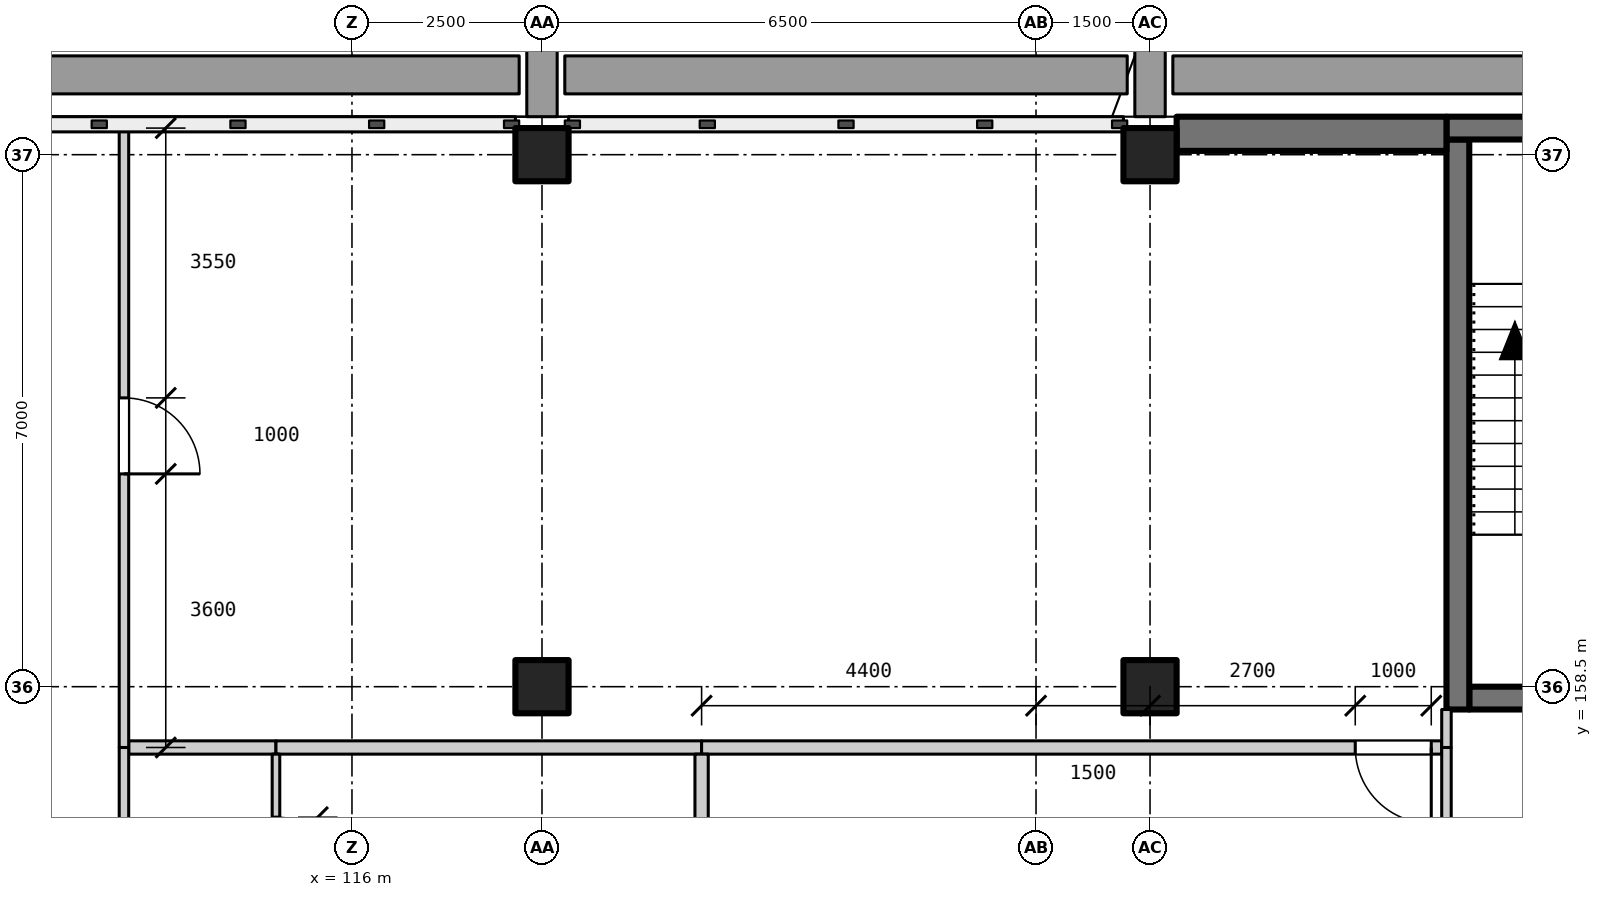
"""IFC4 building model, lengths in metres.
Left out: names, types, materials, properties, quantities, classifications, styles, units other than length and angle.
Written with IfcOpenShell. Run it as: python <this file> out.ifc"""

import sys

from ifc_helpers import new_model, si_unit, direction, frame, frame_2d, origin, origin_2d, place, context, subcontext, project, spatial, rectangle, extrude, element, fill, save


model = new_model("IFC4")
c1 = context("Model", 3, precision=1e-05, world=origin(), true_north=direction((0.0, 1.0)))
c2 = subcontext(c1, "Body", "Model", "MODEL_VIEW")
j1 = project(units=[si_unit("LENGTHUNIT", "METRE"), si_unit("PLANEANGLEUNIT", "RADIAN")], contexts=[c1])
p1 = place(None, origin())
s1 = spatial("IfcSite", under=j1, at=p1, CompositionType="ELEMENT")
p2 = place(p1, origin())
s2 = spatial("IfcBuilding", under=s1, at=p2, CompositionType="ELEMENT")
p3 = place(p2, frame((0.0, 0.0, 6.0)))
s3 = spatial("IfcBuildingStorey", under=s2, at=p3, CompositionType="ELEMENT", Elevation=6.0)
for number, where, z_axis, x_axis in (
    (1, (118.5, 158.5, 0.0), (0.0, 0.0, 1.0), (1.0, 0.0, 0.0)),
    (2, (118.5, 165.5, 0.0), (0.0, 0.0, 1.0), (1.0, 0.0, 0.0)),
    (3, (126.5, 158.5, 0.0), (0.0, 0.0, 1.0), (1.0, 0.0, 0.0)),
    (4, (126.5, 165.5, 0.0), (0.0, 0.0, 1.0), (1.0, 0.0, 0.0)),
):
    element("IfcColumn", number, at=place(p3, frame(where, z_axis=z_axis, x_axis=x_axis)), inside=s3, PredefinedType="COLUMN", context=c2, shape_type="SweptSolid", body=[
        extrude(rectangle(XDim=0.7, YDim=0.7, at=origin_2d()), origin(), (0.0, 0.0, 1.0), 4.2),
    ])
p4 = place(p3, frame((130.7, 158.35, 0.0), z_axis=(0.0, 0.0, 1.0), x_axis=(1.0, 0.0, 0.0)))
e5 = element("IfcWall", 5, at=p4, inside=s3, PredefinedType="SHEAR", context=c2, shape_type="SweptSolid", body=[
    extrude(rectangle(XDim=3.0, YDim=0.3, at=frame_2d((1.5, 0.0))), origin(), (0.0, 0.0, 1.0), 4.2),
])
p5 = place(p4, frame((0.95, 0.0, 0.0)))
e6 = element("IfcOpeningElement", 6, at=p5, cuts=e5, PredefinedType="OPENING", context=c2, shape_type="SweptSolid", body=[
    extrude(rectangle(XDim=1.1, YDim=2.1, at=frame_2d((0.55, 1.05))), frame((0.0, 0.16, 0.0), z_axis=(0.0, -1.0, 0.0), x_axis=(1.0, 0.0, 0.0)), (0.0, 0.0, 1.0), 0.32),
])
p6 = place(p3, frame((130.55, 158.2, 0.0), z_axis=(0.0, 0.0, 1.0), x_axis=(0.0, 1.0, 0.0)))
e7 = element("IfcWall", 7, at=p6, inside=s3, PredefinedType="SHEAR", context=c2, shape_type="SweptSolid", body=[
    extrude(rectangle(XDim=7.5, YDim=0.3, at=frame_2d((3.75, 0.0))), origin(), (0.0, 0.0, 1.0), 4.2),
])
p7 = place(p3, frame((130.4, 165.85, 0.0), z_axis=(0.0, 0.0, 1.0), x_axis=(1.0, 0.0, 0.0)))
e8 = element("IfcWall", 8, at=p7, inside=s3, PredefinedType="SOLIDWALL", context=c2, shape_type="SweptSolid", body=[
    extrude(rectangle(XDim=3.6, YDim=0.3, at=frame_2d((1.8, 0.0))), origin(), (0.0, 0.0, 1.0), 3.9),
])
p8 = place(p3, frame((126.85, 165.775, 0.0), z_axis=(0.0, 0.0, 1.0), x_axis=(1.0, 0.0, 0.0)))
e9 = element("IfcWall", 9, at=p8, inside=s3, PredefinedType="SOLIDWALL", context=c2, shape_type="SweptSolid", body=[
    extrude(rectangle(XDim=3.55, YDim=0.45, at=frame_2d((1.775, 0.0))), origin(), (0.0, 0.0, 1.0), 3.1),
])
p9 = place(p3, frame((113.062, 157.7, 0.0), z_axis=(0.0, 0.0, 1.0), x_axis=(1.0, 0.0, 0.0)))
e10 = element("IfcWall", 10, at=p9, inside=s3, PredefinedType="PARTITIONING", context=c2, shape_type="SweptSolid", body=[
    extrude(rectangle(XDim=1.938, YDim=0.175, at=frame_2d((0.969, 0.0))), origin(), (0.0, 0.0, 1.0), 3.9),
])
p10 = place(p3, frame((115.0, 157.7, 0.0), z_axis=(0.0, 0.0, 1.0), x_axis=(1.0, 0.0, 0.0)))
e11 = element("IfcWall", 11, at=p10, inside=s3, PredefinedType="PARTITIONING", context=c2, shape_type="SweptSolid", body=[
    extrude(rectangle(XDim=5.6, YDim=0.175, at=frame_2d((2.8, 0.0))), origin(), (0.0, 0.0, 1.0), 3.9),
])
p11 = place(p3, frame((120.6, 157.7, 0.0), z_axis=(0.0, 0.0, 1.0), x_axis=(1.0, 0.0, 0.0)))
e12 = element("IfcWall", 12, at=p11, inside=s3, PredefinedType="PARTITIONING", context=c2, shape_type="SweptSolid", body=[
    extrude(rectangle(XDim=9.737, YDim=0.175, at=frame_2d((4.869, 0.0))), origin(), (0.0, 0.0, 1.0), 3.9),
])
p12 = place(p11, frame((8.6, 0.0, 0.0)))
e13 = element("IfcOpeningElement", 13, at=p12, cuts=e12, PredefinedType="OPENING", context=c2, shape_type="SweptSolid", body=[
    extrude(rectangle(XDim=1.0, YDim=2.1, at=frame_2d((0.5, 1.05))), frame((0.0, 0.097, 0.0), z_axis=(0.0, -1.0, 0.0), x_axis=(1.0, 0.0, 0.0)), (0.0, 0.0, 1.0), 0.195),
])
p13 = place(p3, frame((113.0, 149.41, 0.0), z_axis=(0.0, 0.0, 1.0), x_axis=(0.0, 1.0, 0.0)))
e14 = element("IfcWall", 14, at=p13, inside=s3, PredefinedType="PARTITIONING", context=c2, shape_type="SweptSolid", body=[
    extrude(rectangle(XDim=8.29, YDim=0.125, at=frame_2d((4.145, 0.0))), origin(), (0.0, 0.0, 1.0), 3.9),
])
p14 = place(p3, frame((113.0, 157.7, 0.0), z_axis=(0.0, 0.0, 1.0), x_axis=(0.0, 1.0, 0.0)))
e15 = element("IfcWall", 15, at=p14, inside=s3, PredefinedType="PARTITIONING", context=c2, shape_type="SweptSolid", body=[
    extrude(rectangle(XDim=8.15, YDim=0.125, at=frame_2d((4.075, 0.0))), origin(), (0.0, 0.0, 1.0), 3.9),
])
p15 = place(p14, frame((3.6, 0.0, 0.0)))
e16 = element("IfcOpeningElement", 16, at=p15, cuts=e15, PredefinedType="OPENING", context=c2, shape_type="SweptSolid", body=[
    extrude(rectangle(XDim=1.0, YDim=2.1, at=frame_2d((0.5, 1.05))), frame((0.0, 0.073, 0.0), z_axis=(0.0, -1.0, 0.0), x_axis=(1.0, 0.0, 0.0)), (0.0, 0.0, 1.0), 0.145),
])
p16 = place(p3, frame((115.0, 154.933, 0.0), z_axis=(0.0, 0.0, 1.0), x_axis=(0.0, 1.0, 0.0)))
e17 = element("IfcWall", 17, at=p16, inside=s3, PredefinedType="PARTITIONING", context=c2, shape_type="SweptSolid", body=[
    extrude(rectangle(XDim=2.679, YDim=0.1, at=frame_2d((1.34, 0.0))), origin(), (0.0, 0.0, 1.0), 3.9),
])
p17 = place(p16, frame((0.85, 0.0, 0.0)))
e18 = element("IfcOpeningElement", 18, at=p17, cuts=e17, PredefinedType="OPENING", context=c2, shape_type="SweptSolid", body=[
    extrude(rectangle(XDim=1.0, YDim=2.1, at=frame_2d((0.5, 1.05))), frame((0.0, 0.06, 0.0), z_axis=(0.0, -1.0, 0.0), x_axis=(1.0, 0.0, 0.0)), (0.0, 0.0, 1.0), 0.12),
])
p18 = place(p3, frame((120.6, 154.933, 0.0), z_axis=(0.0, 0.0, 1.0), x_axis=(0.0, 1.0, 0.0)))
e19 = element("IfcWall", 19, at=p18, inside=s3, PredefinedType="PARTITIONING", context=c2, shape_type="SweptSolid", body=[
    extrude(rectangle(XDim=2.679, YDim=0.175, at=frame_2d((1.34, 0.0))), origin(), (0.0, 0.0, 1.0), 3.9),
])
p19 = place(p3, frame((130.4, 149.41, 0.0), z_axis=(0.0, 0.0, 1.0), x_axis=(0.0, 1.0, 0.0)))
e20 = element("IfcWall", 20, at=p19, inside=s3, PredefinedType="PARTITIONING", context=c2, shape_type="SweptSolid", body=[
    extrude(rectangle(XDim=8.29, YDim=0.125, at=frame_2d((4.145, 0.0))), origin(), (0.0, 0.0, 1.0), 3.9),
])
p20 = place(p3, frame((130.4, 157.7, 0.0), z_axis=(0.0, 0.0, 1.0), x_axis=(0.0, 1.0, 0.0)))
e21 = element("IfcWall", 21, at=p20, inside=s3, PredefinedType="PARTITIONING", context=c2, shape_type="SweptSolid", body=[
    extrude(rectangle(XDim=0.5, YDim=0.125, at=frame_2d((0.25, 0.0))), origin(), (0.0, 0.0, 1.0), 3.9),
])
p21 = place(p12, frame((1.0, 0.0, 0.0), z_axis=(0.0, 0.0, 1.0), x_axis=(-1.0, 0.0, 0.0)))
e22 = element("IfcDoor", 22, at=p21, inside=s3, OperationType="SINGLE_SWING_LEFT", PredefinedType="DOOR", context=c2, shape_type="SweptSolid", body=[
    extrude(rectangle(XDim=1.0, YDim=2.1, at=frame_2d((0.5, 1.05))), frame((0.0, 0.025, 0.0), z_axis=(0.0, -1.0, 0.0), x_axis=(1.0, 0.0, 0.0)), (0.0, 0.0, 1.0), 0.05),
])
fill(e13, e22)
p22 = place(p15, frame((1.0, 0.0, 0.0), z_axis=(0.0, 0.0, 1.0), x_axis=(-1.0, 0.0, 0.0)))
e23 = element("IfcDoor", 23, at=p22, inside=s3, OperationType="SINGLE_SWING_RIGHT", PredefinedType="DOOR", context=c2, shape_type="SweptSolid", body=[
    extrude(rectangle(XDim=1.0, YDim=2.1, at=frame_2d((0.5, 1.05))), frame((0.0, 0.025, 0.0), z_axis=(0.0, -1.0, 0.0), x_axis=(1.0, 0.0, 0.0)), (0.0, 0.0, 1.0), 0.05),
])
fill(e16, e23)
save(model, sys.argv[1])
